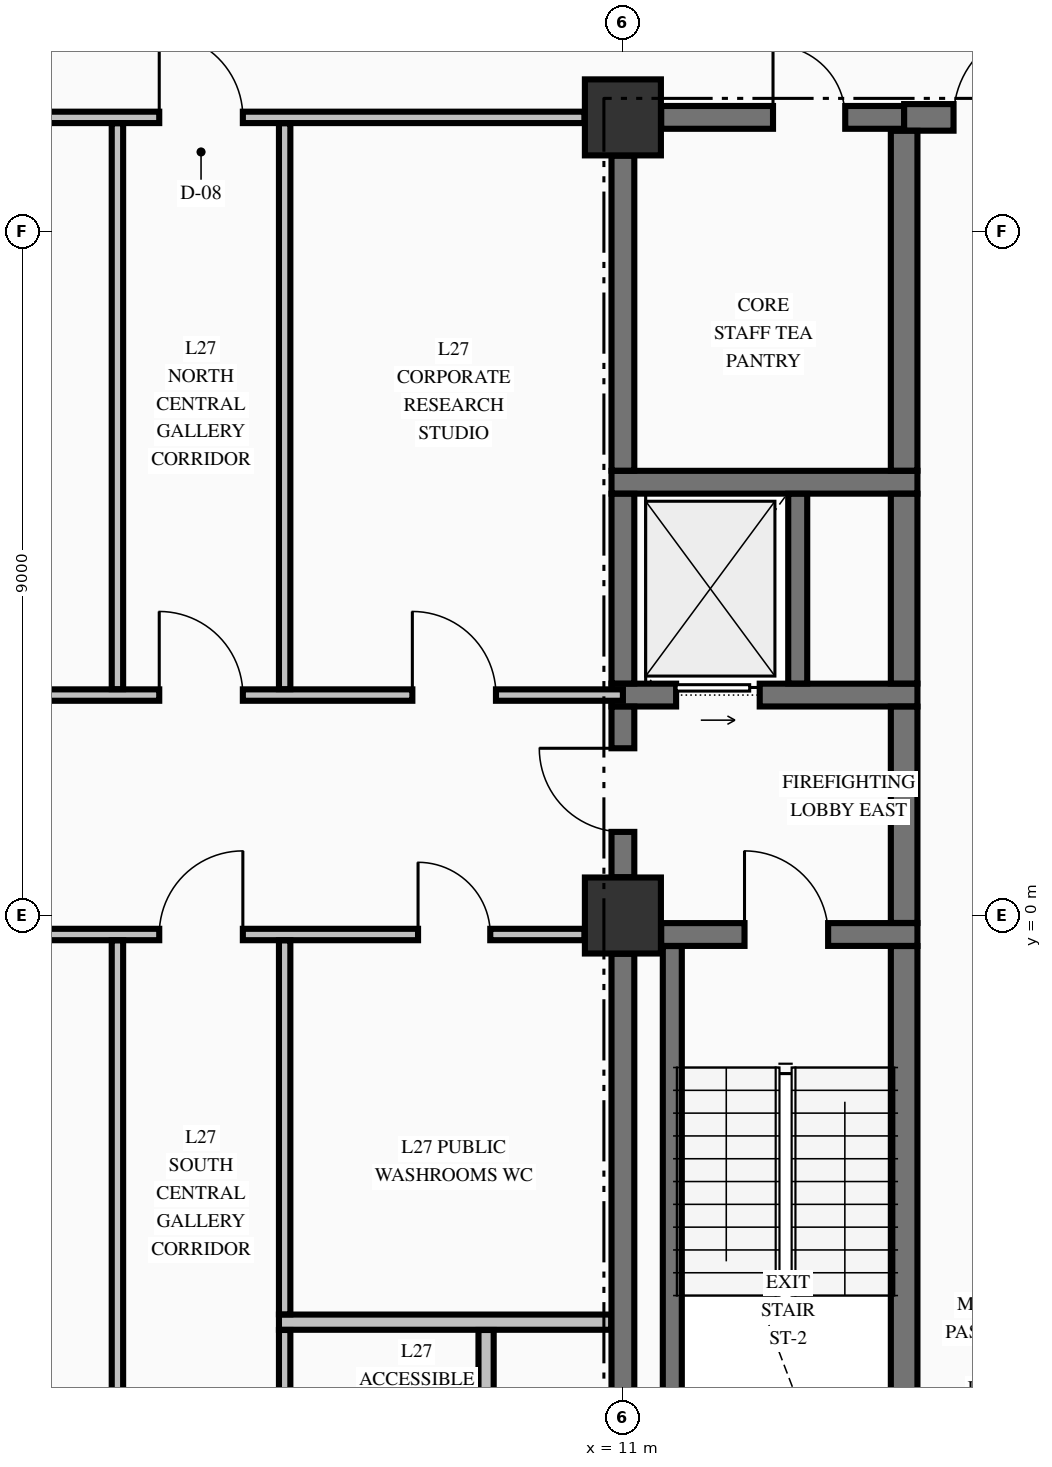
"""IFC4 building model, lengths in metres.
Left out: names, types, materials, properties, quantities, classifications, styles, units other than length and angle.
Written with IfcOpenShell. Run it as: python <this file> out.ifc"""

import sys

from ifc_helpers import new_model, si_unit, direction, frame, frame_2d, origin, origin_2d, place, context, subcontext, project, spatial, rectangle, extrude, element, fill, save


model = new_model("IFC4")
c1 = context("Model", 3, precision=1e-05, world=origin(), true_north=direction((0.0, 1.0)))
c2 = subcontext(c1, "Body", "Model", "MODEL_VIEW")
j1 = project(units=[si_unit("LENGTHUNIT", "METRE"), si_unit("PLANEANGLEUNIT", "RADIAN")], contexts=[c1])
p1 = place(None, origin())
s1 = spatial("IfcSite", under=j1, at=p1, CompositionType="ELEMENT")
p2 = place(p1, origin())
s2 = spatial("IfcBuilding", under=s1, at=p2, CompositionType="ELEMENT")
p3 = place(p2, frame((0.0, 0.0, 109.21)))
s3 = spatial("IfcBuildingStorey", under=s2, at=p3, CompositionType="ELEMENT", Elevation=109.21)
for number, where, z_axis, x_axis in (
    (1, (11.0, 0.0, -0.25), (0.0, 0.0, 1.0), (1.0, 0.0, 0.0)),
    (2, (11.0, 10.5, -0.25), (0.0, 0.0, 1.0), (1.0, 0.0, 0.0)),
):
    element("IfcColumn", number, at=place(p3, frame(where, z_axis=z_axis, x_axis=x_axis)), inside=s3, PredefinedType="COLUMN", context=c2, shape_type="SweptSolid", body=[
        extrude(rectangle(XDim=1.0, YDim=1.0, at=origin_2d()), origin(), (0.0, 0.0, 1.0), 3.57),
    ])
p4 = place(p3, frame((11.504, -0.25, 0.0), z_axis=(0.0, 0.0, 1.0), x_axis=(1.0, 0.0, 0.0)))
e3 = element("IfcWall", 3, at=p4, inside=s3, PredefinedType="SHEAR", context=c2, shape_type="SweptSolid", body=[
    extrude(rectangle(XDim=3.371, YDim=0.3, at=frame_2d((1.686, 0.0))), origin(), (0.0, 0.0, 1.0), 3.32),
])
p5 = place(p4, frame((1.096, 0.0, 0.0)))
e4 = element("IfcOpeningElement", 4, at=p5, cuts=e3, PredefinedType="OPENING", context=c2, shape_type="SweptSolid", body=[
    extrude(rectangle(XDim=1.1, YDim=2.15, at=frame_2d((0.55, 1.075))), frame((0.0, 0.16, 0.0), z_axis=(0.0, -1.0, 0.0), x_axis=(1.0, 0.0, 0.0)), (0.0, 0.0, 1.0), 0.32),
])
p6 = place(p3, frame((10.85, 2.9, 0.0), z_axis=(0.0, 0.0, 1.0), x_axis=(1.0, 0.0, 0.0)))
e5 = element("IfcWall", 5, at=p6, inside=s3, PredefinedType="SHEAR", context=c2, shape_type="SweptSolid", body=[
    extrude(rectangle(XDim=4.025, YDim=0.3, at=frame_2d((2.012, 0.0))), origin(), (0.0, 0.0, 1.0), 3.32),
])
p7 = place(p6, frame((0.85, 0.0, 0.0)))
e6 = element("IfcOpeningElement", 6, at=p7, cuts=e5, PredefinedType="OPENING", context=c2, shape_type="SweptSolid", body=[
    extrude(rectangle(XDim=1.1, YDim=2.2, at=frame_2d((0.55, 1.1))), frame((0.0, 0.16, 0.0), z_axis=(0.0, -1.0, 0.0), x_axis=(1.0, 0.0, 0.0)), (0.0, 0.0, 1.0), 0.32),
])
p8 = place(p3, frame((10.85, 5.7, 0.0), z_axis=(0.0, 0.0, 1.0), x_axis=(1.0, 0.0, 0.0)))
e7 = element("IfcWall", 7, at=p8, inside=s3, PredefinedType="SHEAR", context=c2, shape_type="SweptSolid", body=[
    extrude(rectangle(XDim=4.025, YDim=0.3, at=frame_2d((2.012, 0.0))), origin(), (0.0, 0.0, 1.0), 3.32),
])
p9 = place(p3, frame((11.504, 10.5, 0.0), z_axis=(0.0, 0.0, 1.0), x_axis=(1.0, 0.0, 0.0)))
e8 = element("IfcWall", 8, at=p9, inside=s3, PredefinedType="SHEAR", context=c2, shape_type="SweptSolid", body=[
    extrude(rectangle(XDim=3.196, YDim=0.3, at=frame_2d((1.598, 0.0))), origin(), (0.0, 0.0, 1.0), 3.32),
])
p10 = place(p9, frame((1.471, 0.0, 0.0)))
e9 = element("IfcOpeningElement", 9, at=p10, cuts=e8, PredefinedType="OPENING", context=c2, shape_type="SweptSolid", body=[
    extrude(rectangle(XDim=0.95, YDim=2.15, at=frame_2d((0.475, 1.075))), frame((0.0, 0.16, 0.0), z_axis=(0.0, -1.0, 0.0), x_axis=(1.0, 0.0, 0.0)), (0.0, 0.0, 1.0), 0.32),
])
p11 = place(p3, frame((14.7, 10.5, 0.0), z_axis=(0.0, 0.0, 1.0), x_axis=(1.0, 0.0, 0.0)))
e10 = element("IfcWall", 10, at=p11, inside=s3, PredefinedType="SHEAR", context=c2, shape_type="SweptSolid", body=[
    extrude(rectangle(XDim=4.796, YDim=0.35, at=frame_2d((2.398, 0.0))), origin(), (0.0, 0.0, 1.0), 3.32),
])
p12 = place(p11, frame((0.65, 0.0, 0.0)))
e11 = element("IfcOpeningElement", 11, at=p12, cuts=e10, PredefinedType="OPENING", context=c2, shape_type="SweptSolid", body=[
    extrude(rectangle(XDim=1.2, YDim=2.15, at=frame_2d((0.6, 1.075))), frame((0.0, 0.185, 0.0), z_axis=(0.0, -1.0, 0.0), x_axis=(1.0, 0.0, 0.0)), (0.0, 0.0, 1.0), 0.37),
])
p13 = place(p11, frame((3.225, 0.0, 0.0)))
e12 = element("IfcOpeningElement", 12, at=p13, cuts=e10, PredefinedType="OPENING", context=c2, shape_type="SweptSolid", body=[
    extrude(rectangle(XDim=0.95, YDim=2.15, at=frame_2d((0.475, 1.075))), frame((0.0, 0.185, 0.0), z_axis=(0.0, -1.0, 0.0), x_axis=(1.0, 0.0, 0.0)), (0.0, 0.0, 1.0), 0.37),
])
p14 = place(p3, frame((6.475, -5.35, 0.0), z_axis=(0.0, 0.0, 1.0), x_axis=(1.0, 0.0, 0.0)))
e13 = element("IfcWall", 13, at=p14, inside=s3, PredefinedType="PARTITIONING", context=c2, shape_type="SweptSolid", body=[
    extrude(rectangle(XDim=4.372, YDim=0.2, at=frame_2d((2.186, 0.0))), origin(), (0.0, 0.0, 1.0), 3.32),
])
p15 = place(p3, frame((-10.494, -0.25, 0.0), z_axis=(0.0, 0.0, 1.0), x_axis=(1.0, 0.0, 0.0)))
e14 = element("IfcWall", 14, at=p15, inside=s3, PredefinedType="PARTITIONING", context=c2, shape_type="SweptSolid", body=[
    extrude(rectangle(XDim=20.988, YDim=0.15, at=frame_2d((10.494, 0.0))), origin(), (0.0, 0.0, 1.0), 3.32),
])
p16 = place(p15, frame((15.394, 0.0, 0.0)))
e15 = element("IfcOpeningElement", 15, at=p16, cuts=e14, PredefinedType="OPENING", context=c2, shape_type="SweptSolid", body=[
    extrude(rectangle(XDim=1.1, YDim=2.15, at=frame_2d((0.55, 1.075))), frame((0.0, 0.085, 0.0), z_axis=(0.0, -1.0, 0.0), x_axis=(1.0, 0.0, 0.0)), (0.0, 0.0, 1.0), 0.17),
])
p17 = place(p15, frame((6.639, 0.0, 0.0)))
e16 = element("IfcOpeningElement", 16, at=p17, cuts=e14, PredefinedType="OPENING", context=c2, shape_type="SweptSolid", body=[
    extrude(rectangle(XDim=1.05, YDim=2.15, at=frame_2d((0.525, 1.075))), frame((0.0, 0.085, 0.0), z_axis=(0.0, -1.0, 0.0), x_axis=(1.0, 0.0, 0.0)), (0.0, 0.0, 1.0), 0.17),
])
p18 = place(p15, frame((18.799, 0.0, 0.0)))
e17 = element("IfcOpeningElement", 17, at=p18, cuts=e14, PredefinedType="OPENING", context=c2, shape_type="SweptSolid", body=[
    extrude(rectangle(XDim=0.95, YDim=2.15, at=frame_2d((0.475, 1.075))), frame((0.0, 0.085, 0.0), z_axis=(0.0, -1.0, 0.0), x_axis=(1.0, 0.0, 0.0)), (0.0, 0.0, 1.0), 0.17),
])
p19 = place(p3, frame((-11.0, 2.9, 0.0), z_axis=(0.0, 0.0, 1.0), x_axis=(1.0, 0.0, 0.0)))
e18 = element("IfcWall", 18, at=p19, inside=s3, PredefinedType="PARTITIONING", context=c2, shape_type="SweptSolid", body=[
    extrude(rectangle(XDim=22.0, YDim=0.15, at=frame_2d((11.0, 0.0))), origin(), (0.0, 0.0, 1.0), 3.32),
])
p20 = place(p19, frame((15.9, 0.0, 0.0)))
e19 = element("IfcOpeningElement", 19, at=p20, cuts=e18, PredefinedType="OPENING", context=c2, shape_type="SweptSolid", body=[
    extrude(rectangle(XDim=1.1, YDim=2.15, at=frame_2d((0.55, 1.075))), frame((0.0, 0.085, 0.0), z_axis=(0.0, -1.0, 0.0), x_axis=(1.0, 0.0, 0.0)), (0.0, 0.0, 1.0), 0.17),
])
p21 = place(p19, frame((7.145, 0.0, 0.0)))
e20 = element("IfcOpeningElement", 20, at=p21, cuts=e18, PredefinedType="OPENING", context=c2, shape_type="SweptSolid", body=[
    extrude(rectangle(XDim=1.05, YDim=2.15, at=frame_2d((0.525, 1.075))), frame((0.0, 0.085, 0.0), z_axis=(0.0, -1.0, 0.0), x_axis=(1.0, 0.0, 0.0)), (0.0, 0.0, 1.0), 0.17),
])
p22 = place(p19, frame((19.23, 0.0, 0.0)))
e21 = element("IfcOpeningElement", 21, at=p22, cuts=e18, PredefinedType="OPENING", context=c2, shape_type="SweptSolid", body=[
    extrude(rectangle(XDim=1.1, YDim=2.15, at=frame_2d((0.55, 1.075))), frame((0.0, 0.085, 0.0), z_axis=(0.0, -1.0, 0.0), x_axis=(1.0, 0.0, 0.0)), (0.0, 0.0, 1.0), 0.17),
])
p23 = place(p3, frame((-10.494, 10.5, 0.0), z_axis=(0.0, 0.0, 1.0), x_axis=(1.0, 0.0, 0.0)))
e22 = element("IfcWall", 22, at=p23, inside=s3, PredefinedType="PARTITIONING", context=c2, shape_type="SweptSolid", body=[
    extrude(rectangle(XDim=20.988, YDim=0.15, at=frame_2d((10.494, 0.0))), origin(), (0.0, 0.0, 1.0), 3.32),
])
p24 = place(p23, frame((15.394, 0.0, 0.0)))
e23 = element("IfcOpeningElement", 23, at=p24, cuts=e22, PredefinedType="OPENING", context=c2, shape_type="SweptSolid", body=[
    extrude(rectangle(XDim=1.1, YDim=2.15, at=frame_2d((0.55, 1.075))), frame((0.0, 0.085, 0.0), z_axis=(0.0, -1.0, 0.0), x_axis=(1.0, 0.0, 0.0)), (0.0, 0.0, 1.0), 0.17),
])
p25 = place(p3, frame((11.0, -9.446, 0.0), z_axis=(0.0, 0.0, 1.0), x_axis=(0.0, 1.0, 0.0)))
e24 = element("IfcWall", 24, at=p25, inside=s3, PredefinedType="SHEAR", context=c2, shape_type="SweptSolid", body=[
    extrude(rectangle(XDim=8.942, YDim=0.3, at=frame_2d((4.471, 0.0))), origin(), (0.0, 0.0, 1.0), 3.32),
])
p26 = place(p3, frame((11.0, 0.504, 0.0), z_axis=(0.0, 0.0, 1.0), x_axis=(0.0, 1.0, 0.0)))
e25 = element("IfcWall", 25, at=p26, inside=s3, PredefinedType="SHEAR", context=c2, shape_type="SweptSolid", body=[
    extrude(rectangle(XDim=2.244, YDim=0.3, at=frame_2d((1.122, 0.0))), origin(), (0.0, 0.0, 1.0), 3.32),
])
p27 = place(p26, frame((0.596, 0.0, 0.0)))
e26 = element("IfcOpeningElement", 26, at=p27, cuts=e25, PredefinedType="OPENING", context=c2, shape_type="SweptSolid", body=[
    extrude(rectangle(XDim=1.1, YDim=2.15, at=frame_2d((0.55, 1.075))), frame((0.0, 0.16, 0.0), z_axis=(0.0, -1.0, 0.0), x_axis=(1.0, 0.0, 0.0)), (0.0, 0.0, 1.0), 0.32),
])
p28 = place(p3, frame((11.0, 3.052, 0.0), z_axis=(0.0, 0.0, 1.0), x_axis=(0.0, 1.0, 0.0)))
e27 = element("IfcWall", 27, at=p28, inside=s3, PredefinedType="SHEAR", context=c2, shape_type="SweptSolid", body=[
    extrude(rectangle(XDim=2.496, YDim=0.3, at=frame_2d((1.248, 0.0))), origin(), (0.0, 0.0, 1.0), 3.32),
])
p29 = place(p3, frame((11.0, 5.852, 0.0), z_axis=(0.0, 0.0, 1.0), x_axis=(0.0, 1.0, 0.0)))
e28 = element("IfcWall", 28, at=p29, inside=s3, PredefinedType="SHEAR", context=c2, shape_type="SweptSolid", body=[
    extrude(rectangle(XDim=4.144, YDim=0.3, at=frame_2d((2.072, 0.0))), origin(), (0.0, 0.0, 1.0), 3.32),
])
p30 = place(p3, frame((11.65, -9.798, 0.0), z_axis=(0.0, 0.0, 1.0), x_axis=(0.0, 1.0, 0.0)))
e29 = element("IfcWall", 29, at=p30, inside=s3, PredefinedType="SOLIDWALL", context=c2, shape_type="SweptSolid", body=[
    extrude(rectangle(XDim=9.396, YDim=0.25, at=frame_2d((4.698, 0.0))), origin(), (0.0, 0.0, 1.0), 3.32),
])
p31 = place(p3, frame((13.3, 3.052, 0.0), z_axis=(0.0, 0.0, 1.0), x_axis=(0.0, 1.0, 0.0)))
e30 = element("IfcWall", 30, at=p31, inside=s3, PredefinedType="SOLIDWALL", context=c2, shape_type="SweptSolid", body=[
    extrude(rectangle(XDim=2.496, YDim=0.25, at=frame_2d((1.248, 0.0))), origin(), (0.0, 0.0, 1.0), 3.32),
])
p32 = place(p3, frame((14.7, -9.773, 0.0), z_axis=(0.0, 0.0, 1.0), x_axis=(0.0, 1.0, 0.0)))
e31 = element("IfcWall", 31, at=p32, inside=s3, PredefinedType="SHEAR", context=c2, shape_type="SweptSolid", body=[
    extrude(rectangle(XDim=9.371, YDim=0.35, at=frame_2d((4.686, 0.0))), origin(), (0.0, 0.0, 1.0), 3.32),
])
p33 = place(p3, frame((14.7, -0.098, 0.0), z_axis=(0.0, 0.0, 1.0), x_axis=(0.0, 1.0, 0.0)))
e32 = element("IfcWall", 32, at=p33, inside=s3, PredefinedType="SHEAR", context=c2, shape_type="SweptSolid", body=[
    extrude(rectangle(XDim=2.846, YDim=0.35, at=frame_2d((1.423, 0.0))), origin(), (0.0, 0.0, 1.0), 3.32),
])
p34 = place(p3, frame((14.7, 3.052, 0.0), z_axis=(0.0, 0.0, 1.0), x_axis=(0.0, 1.0, 0.0)))
e33 = element("IfcWall", 33, at=p34, inside=s3, PredefinedType="SHEAR", context=c2, shape_type="SweptSolid", body=[
    extrude(rectangle(XDim=2.496, YDim=0.35, at=frame_2d((1.248, 0.0))), origin(), (0.0, 0.0, 1.0), 3.32),
])
p35 = place(p3, frame((14.7, 5.852, 0.0), z_axis=(0.0, 0.0, 1.0), x_axis=(0.0, 1.0, 0.0)))
e34 = element("IfcWall", 34, at=p35, inside=s3, PredefinedType="SHEAR", context=c2, shape_type="SweptSolid", body=[
    extrude(rectangle(XDim=4.471, YDim=0.35, at=frame_2d((2.235, 0.0))), origin(), (0.0, 0.0, 1.0), 3.32),
])
p36 = place(p3, frame((4.35, -9.872, 0.0), z_axis=(0.0, 0.0, 1.0), x_axis=(0.0, 1.0, 0.0)))
e35 = element("IfcWall", 35, at=p36, inside=s3, PredefinedType="PARTITIONING", context=c2, shape_type="SweptSolid", body=[
    extrude(rectangle(XDim=9.544, YDim=0.15, at=frame_2d((4.772, 0.0))), origin(), (0.0, 0.0, 1.0), 3.32),
])
p37 = place(p3, frame((4.35, 2.978, 0.0), z_axis=(0.0, 0.0, 1.0), x_axis=(0.0, 1.0, 0.0)))
e36 = element("IfcWall", 36, at=p37, inside=s3, PredefinedType="PARTITIONING", context=c2, shape_type="SweptSolid", body=[
    extrude(rectangle(XDim=7.444, YDim=0.15, at=frame_2d((3.722, 0.0))), origin(), (0.0, 0.0, 1.0), 3.32),
])
p38 = place(p3, frame((6.55, -9.872, 0.0), z_axis=(0.0, 0.0, 1.0), x_axis=(0.0, 1.0, 0.0)))
e37 = element("IfcWall", 37, at=p38, inside=s3, PredefinedType="PARTITIONING", context=c2, shape_type="SweptSolid", body=[
    extrude(rectangle(XDim=4.419, YDim=0.15, at=frame_2d((2.209, 0.0))), origin(), (0.0, 0.0, 1.0), 3.32),
])
p39 = place(p38, frame((1.997, 0.0, 0.0)))
e38 = element("IfcOpeningElement", 38, at=p39, cuts=e37, PredefinedType="OPENING", context=c2, shape_type="SweptSolid", body=[
    extrude(rectangle(XDim=0.95, YDim=2.15, at=frame_2d((0.475, 1.075))), frame((0.0, 0.085, 0.0), z_axis=(0.0, -1.0, 0.0), x_axis=(1.0, 0.0, 0.0)), (0.0, 0.0, 1.0), 0.17),
])
p40 = place(p3, frame((6.55, -5.247, 0.0), z_axis=(0.0, 0.0, 1.0), x_axis=(0.0, 1.0, 0.0)))
e39 = element("IfcWall", 39, at=p40, inside=s3, PredefinedType="PARTITIONING", context=c2, shape_type="SweptSolid", body=[
    extrude(rectangle(XDim=4.919, YDim=0.15, at=frame_2d((2.459, 0.0))), origin(), (0.0, 0.0, 1.0), 3.32),
])
p41 = place(p3, frame((6.55, 2.978, 0.0), z_axis=(0.0, 0.0, 1.0), x_axis=(0.0, 1.0, 0.0)))
e40 = element("IfcWall", 40, at=p41, inside=s3, PredefinedType="PARTITIONING", context=c2, shape_type="SweptSolid", body=[
    extrude(rectangle(XDim=7.444, YDim=0.15, at=frame_2d((3.722, 0.0))), origin(), (0.0, 0.0, 1.0), 3.32),
])
p42 = place(p3, frame((9.2, -9.872, 0.0), z_axis=(0.0, 0.0, 1.0), x_axis=(0.0, 1.0, 0.0)))
e41 = element("IfcWall", 41, at=p42, inside=s3, PredefinedType="PARTITIONING", context=c2, shape_type="SweptSolid", body=[
    extrude(rectangle(XDim=4.419, YDim=0.2, at=frame_2d((2.209, 0.0))), origin(), (0.0, 0.0, 1.0), 3.32),
])
p43 = place(p5, origin())
e42 = element("IfcDoor", 42, at=p43, inside=s3, OperationType="SINGLE_SWING_LEFT", PredefinedType="DOOR", context=c2, shape_type="SweptSolid", body=[
    extrude(rectangle(XDim=1.1, YDim=2.15, at=frame_2d((0.55, 1.075))), frame((0.0, 0.025, 0.0), z_axis=(0.0, -1.0, 0.0), x_axis=(1.0, 0.0, 0.0)), (0.0, 0.0, 1.0), 0.05),
])
fill(e4, e42)
p44 = place(p27, origin())
e43 = element("IfcDoor", 43, at=p44, inside=s3, OperationType="SINGLE_SWING_RIGHT", PredefinedType="DOOR", context=c2, shape_type="SweptSolid", body=[
    extrude(rectangle(XDim=1.1, YDim=2.15, at=frame_2d((0.55, 1.075))), frame((0.0, 0.025, 0.0), z_axis=(0.0, -1.0, 0.0), x_axis=(1.0, 0.0, 0.0)), (0.0, 0.0, 1.0), 0.05),
])
fill(e26, e43)
p45 = place(p7, origin())
e44 = element("IfcDoor", 44, at=p45, inside=s3, OperationType="SLIDING_TO_RIGHT", PredefinedType="DOOR", context=c2, shape_type="SweptSolid", body=[
    extrude(rectangle(XDim=1.1, YDim=2.2, at=frame_2d((0.55, 1.1))), frame((0.0, 0.025, 0.0), z_axis=(0.0, -1.0, 0.0), x_axis=(1.0, 0.0, 0.0)), (0.0, 0.0, 1.0), 0.05),
])
fill(e6, e44)
p46 = place(p10, origin())
e45 = element("IfcDoor", 45, at=p46, inside=s3, OperationType="SINGLE_SWING_LEFT", PredefinedType="DOOR", context=c2, shape_type="SweptSolid", body=[
    extrude(rectangle(XDim=0.95, YDim=2.15, at=frame_2d((0.475, 1.075))), frame((0.0, 0.025, 0.0), z_axis=(0.0, -1.0, 0.0), x_axis=(1.0, 0.0, 0.0)), (0.0, 0.0, 1.0), 0.05),
])
fill(e9, e45)
p47 = place(p12, origin())
e46 = element("IfcDoor", 46, at=p47, inside=s3, OperationType="SINGLE_SWING_RIGHT", PredefinedType="DOOR", context=c2, shape_type="SweptSolid", body=[
    extrude(rectangle(XDim=1.2, YDim=2.15, at=frame_2d((0.6, 1.075))), frame((0.0, 0.025, 0.0), z_axis=(0.0, -1.0, 0.0), x_axis=(1.0, 0.0, 0.0)), (0.0, 0.0, 1.0), 0.05),
])
fill(e11, e46)
p48 = place(p24, origin())
e47 = element("IfcDoor", 47, at=p48, inside=s3, OperationType="SINGLE_SWING_LEFT", PredefinedType="DOOR", context=c2, shape_type="SweptSolid", body=[
    extrude(rectangle(XDim=1.1, YDim=2.15, at=frame_2d((0.55, 1.075))), frame((0.0, 0.025, 0.0), z_axis=(0.0, -1.0, 0.0), x_axis=(1.0, 0.0, 0.0)), (0.0, 0.0, 1.0), 0.05),
])
fill(e23, e47)
p49 = place(p20, origin())
e48 = element("IfcDoor", 48, at=p49, inside=s3, OperationType="SINGLE_SWING_LEFT", PredefinedType="DOOR", context=c2, shape_type="SweptSolid", body=[
    extrude(rectangle(XDim=1.1, YDim=2.15, at=frame_2d((0.55, 1.075))), frame((0.0, 0.025, 0.0), z_axis=(0.0, -1.0, 0.0), x_axis=(1.0, 0.0, 0.0)), (0.0, 0.0, 1.0), 0.05),
])
fill(e19, e48)
p50 = place(p16, origin())
e49 = element("IfcDoor", 49, at=p50, inside=s3, OperationType="SINGLE_SWING_RIGHT", PredefinedType="DOOR", context=c2, shape_type="SweptSolid", body=[
    extrude(rectangle(XDim=1.1, YDim=2.15, at=frame_2d((0.55, 1.075))), frame((0.0, 0.025, 0.0), z_axis=(0.0, -1.0, 0.0), x_axis=(1.0, 0.0, 0.0)), (0.0, 0.0, 1.0), 0.05),
])
fill(e15, e49)
p51 = place(p22, origin())
e50 = element("IfcDoor", 50, at=p51, inside=s3, OperationType="SINGLE_SWING_LEFT", PredefinedType="DOOR", context=c2, shape_type="SweptSolid", body=[
    extrude(rectangle(XDim=1.1, YDim=2.15, at=frame_2d((0.55, 1.075))), frame((0.0, 0.025, 0.0), z_axis=(0.0, -1.0, 0.0), x_axis=(1.0, 0.0, 0.0)), (0.0, 0.0, 1.0), 0.05),
])
fill(e21, e50)
p52 = place(p18, origin())
e51 = element("IfcDoor", 51, at=p52, inside=s3, OperationType="SINGLE_SWING_LEFT", PredefinedType="DOOR", context=c2, shape_type="SweptSolid", body=[
    extrude(rectangle(XDim=0.95, YDim=2.15, at=frame_2d((0.475, 1.075))), frame((0.0, 0.025, 0.0), z_axis=(0.0, -1.0, 0.0), x_axis=(1.0, 0.0, 0.0)), (0.0, 0.0, 1.0), 0.05),
])
fill(e17, e51)
save(model, sys.argv[1])
